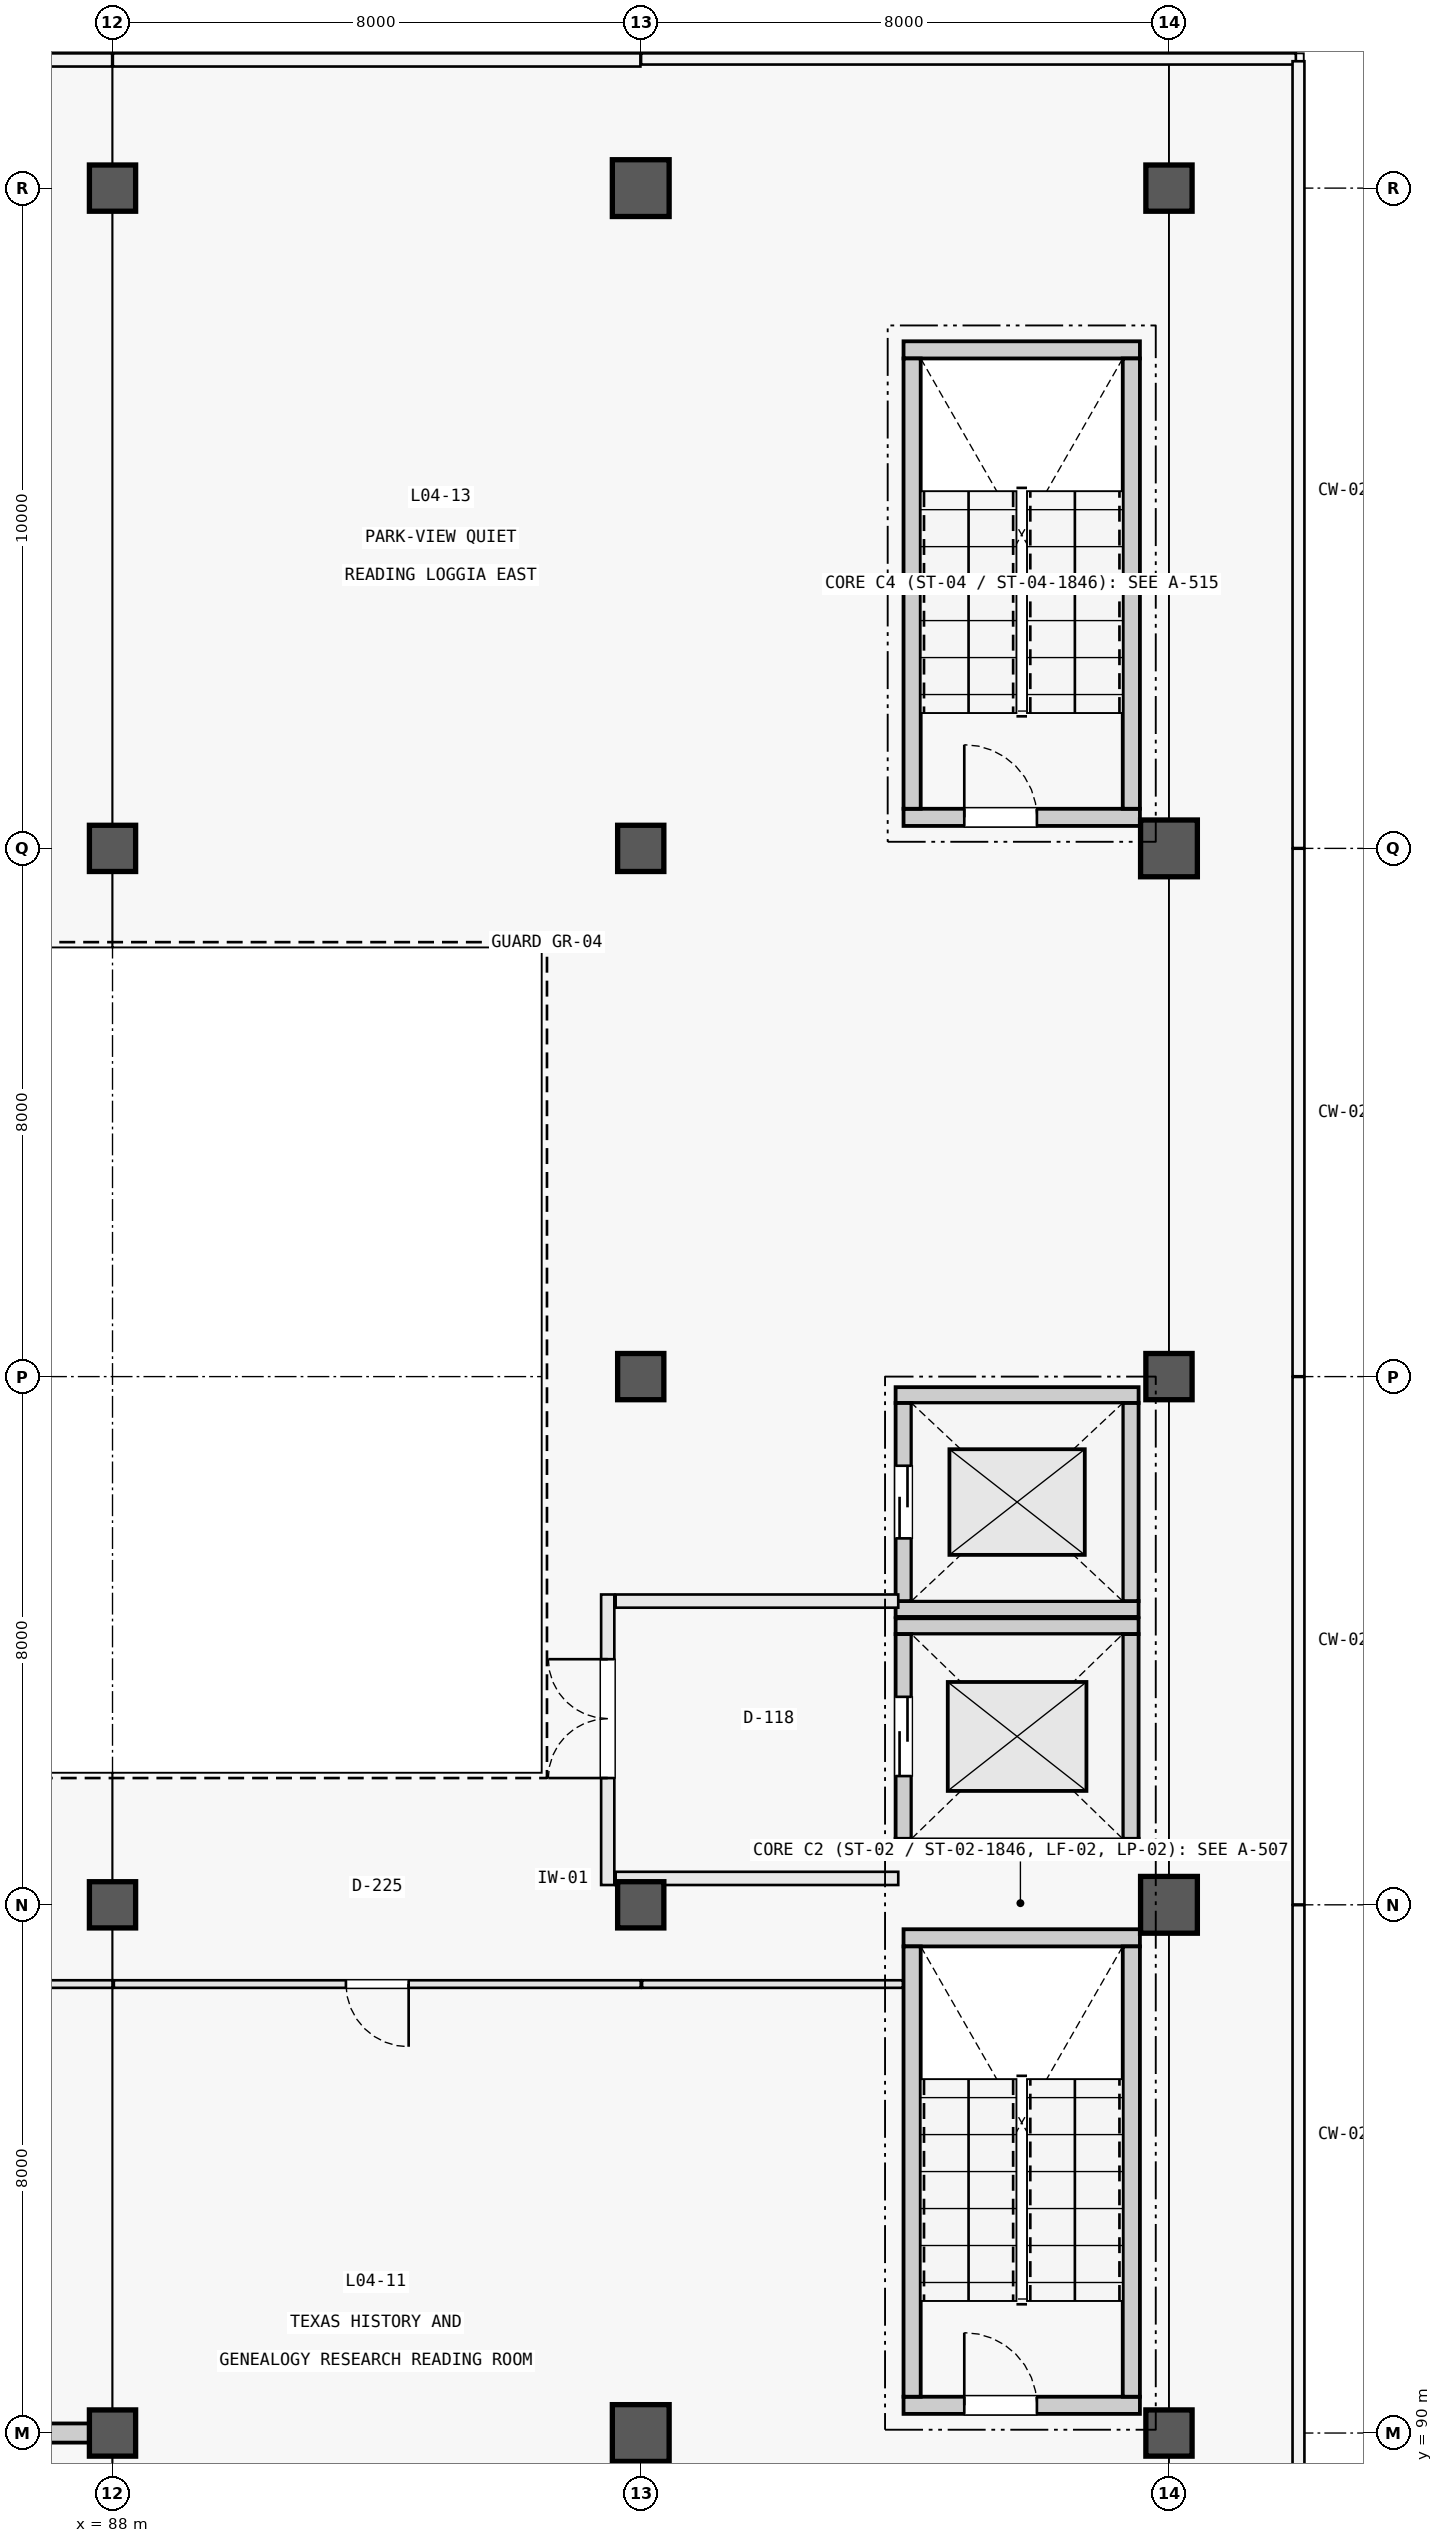
"""IFC4 building model, lengths in metres.
Left out: names, types, materials, properties, quantities, classifications, styles, units other than length and angle.
Written with IfcOpenShell. Run it as: python <this file> out.ifc"""

import sys

from ifc_helpers import new_model, si_unit, direction, frame, frame_2d, origin, origin_2d, place, context, subcontext, project, spatial, rectangle, extrude, element, fill, save


model = new_model("IFC4")
c1 = context("Model", 3, precision=1e-05, world=origin(), true_north=direction((0.0, 1.0)))
c2 = subcontext(c1, "Body", "Model", "MODEL_VIEW")
j1 = project(units=[si_unit("LENGTHUNIT", "METRE"), si_unit("PLANEANGLEUNIT", "RADIAN")], contexts=[c1])
p1 = place(None, origin())
s1 = spatial("IfcSite", under=j1, at=p1, CompositionType="ELEMENT")
p2 = place(p1, origin())
s2 = spatial("IfcBuilding", under=s1, at=p2, CompositionType="ELEMENT")
p3 = place(p2, frame((0.0, 0.0, 15.3)))
s3 = spatial("IfcBuildingStorey", under=s2, at=p3, CompositionType="ELEMENT", Elevation=15.3)
for number, where, z_axis, x_axis in (
    (1, (88.0, 90.0, 0.0), (0.0, 0.0, 1.0), (1.0, 0.0, 0.0)),
    (2, (88.0, 98.0, 0.0), (0.0, 0.0, 1.0), (1.0, 0.0, 0.0)),
    (3, (88.0, 114.0, 0.0), (0.0, 0.0, 1.0), (1.0, 0.0, 0.0)),
    (4, (88.0, 124.0, 0.0), (0.0, 0.0, 1.0), (1.0, 0.0, 0.0)),
):
    element("IfcColumn", number, at=place(p3, frame(where, z_axis=z_axis, x_axis=x_axis)), inside=s3, PredefinedType="COLUMN", context=c2, shape_type="SweptSolid", body=[
        extrude(rectangle(XDim=0.7, YDim=0.7, at=origin_2d()), origin(), (0.0, 0.0, 1.0), 4.8),
    ])
p4 = place(p3, frame((96.0, 90.0, 0.0), z_axis=(0.0, 0.0, 1.0), x_axis=(1.0, 0.0, 0.0)))
e5 = element("IfcColumn", 5, at=p4, inside=s3, PredefinedType="COLUMN", context=c2, shape_type="SweptSolid", body=[
    extrude(rectangle(XDim=0.86, YDim=0.86, at=origin_2d()), origin(), (0.0, 0.0, 1.0), 4.8),
])
for number, where, z_axis, x_axis in (
    (6, (96.0, 98.0, 0.0), (0.0, 0.0, 1.0), (1.0, 0.0, 0.0)),
    (7, (96.0, 106.0, 0.0), (0.0, 0.0, 1.0), (1.0, 0.0, 0.0)),
    (8, (96.0, 114.0, 0.0), (0.0, 0.0, 1.0), (1.0, 0.0, 0.0)),
):
    element("IfcColumn", number, at=place(p3, frame(where, z_axis=z_axis, x_axis=x_axis)), inside=s3, PredefinedType="COLUMN", context=c2, shape_type="SweptSolid", body=[
        extrude(rectangle(XDim=0.7, YDim=0.7, at=origin_2d()), origin(), (0.0, 0.0, 1.0), 4.8),
    ])
p5 = place(p3, frame((96.0, 124.0, 0.0), z_axis=(0.0, 0.0, 1.0), x_axis=(1.0, 0.0, 0.0)))
e9 = element("IfcColumn", 9, at=p5, inside=s3, PredefinedType="COLUMN", context=c2, shape_type="SweptSolid", body=[
    extrude(rectangle(XDim=0.86, YDim=0.86, at=origin_2d()), origin(), (0.0, 0.0, 1.0), 4.8),
])
p6 = place(p3, frame((104.0, 90.0, 0.0), z_axis=(0.0, 0.0, 1.0), x_axis=(1.0, 0.0, 0.0)))
e10 = element("IfcColumn", 10, at=p6, inside=s3, PredefinedType="COLUMN", context=c2, shape_type="SweptSolid", body=[
    extrude(rectangle(XDim=0.7, YDim=0.7, at=origin_2d()), origin(), (0.0, 0.0, 1.0), 4.8),
])
p7 = place(p3, frame((104.0, 98.0, 0.0), z_axis=(0.0, 0.0, 1.0), x_axis=(1.0, 0.0, 0.0)))
e11 = element("IfcColumn", 11, at=p7, inside=s3, PredefinedType="COLUMN", context=c2, shape_type="SweptSolid", body=[
    extrude(rectangle(XDim=0.86, YDim=0.86, at=origin_2d()), origin(), (0.0, 0.0, 1.0), 4.8),
])
p8 = place(p3, frame((104.0, 106.0, 0.0), z_axis=(0.0, 0.0, 1.0), x_axis=(1.0, 0.0, 0.0)))
e12 = element("IfcColumn", 12, at=p8, inside=s3, PredefinedType="COLUMN", context=c2, shape_type="SweptSolid", body=[
    extrude(rectangle(XDim=0.7, YDim=0.7, at=origin_2d()), origin(), (0.0, 0.0, 1.0), 4.8),
])
p9 = place(p3, frame((104.0, 114.0, 0.0), z_axis=(0.0, 0.0, 1.0), x_axis=(1.0, 0.0, 0.0)))
e13 = element("IfcColumn", 13, at=p9, inside=s3, PredefinedType="COLUMN", context=c2, shape_type="SweptSolid", body=[
    extrude(rectangle(XDim=0.86, YDim=0.86, at=origin_2d()), origin(), (0.0, 0.0, 1.0), 4.8),
])
p10 = place(p3, frame((104.0, 124.0, 0.0), z_axis=(0.0, 0.0, 1.0), x_axis=(1.0, 0.0, 0.0)))
e14 = element("IfcColumn", 14, at=p10, inside=s3, PredefinedType="COLUMN", context=c2, shape_type="SweptSolid", body=[
    extrude(rectangle(XDim=0.7, YDim=0.7, at=origin_2d()), origin(), (0.0, 0.0, 1.0), 4.8),
])
p11 = place(p3, frame((80.43, 90.0, 0.0), z_axis=(0.0, 0.0, 1.0), x_axis=(1.0, 0.0, 0.0)))
e15 = element("IfcWall", 15, at=p11, inside=s3, PredefinedType="SHEAR", context=c2, shape_type="SweptSolid", body=[
    extrude(rectangle(XDim=7.22, YDim=0.29, at=frame_2d((3.61, 0.0))), origin(), (0.0, 0.0, 1.0), 4.52),
])
p12 = place(p3, frame((99.98, 90.42, 0.0), z_axis=(0.0, 0.0, 1.0), x_axis=(1.0, 0.0, 0.0)))
e16 = element("IfcWall", 16, at=p12, inside=s3, PredefinedType="SOLIDWALL", context=c2, shape_type="SweptSolid", body=[
    extrude(rectangle(XDim=3.58, YDim=0.26, at=frame_2d((1.79, 0.0))), origin(), (0.0, 0.0, 1.0), 4.8),
])
p13 = place(p12, frame((0.92, 0.0, 0.0)))
e17 = element("IfcOpeningElement", 17, at=p13, cuts=e16, PredefinedType="OPENING", context=c2, shape_type="SweptSolid", body=[
    extrude(rectangle(XDim=1.1, YDim=2.2, at=frame_2d((0.55, 1.1))), frame((0.0, 0.142, 0.0), z_axis=(0.0, -1.0, 0.0), x_axis=(1.0, 0.0, 0.0)), (0.0, 0.0, 1.0), 0.284),
])
p14 = place(p3, frame((99.98, 97.5, 0.0), z_axis=(0.0, 0.0, 1.0), x_axis=(1.0, 0.0, 0.0)))
e18 = element("IfcWall", 18, at=p14, inside=s3, PredefinedType="SOLIDWALL", context=c2, shape_type="SweptSolid", body=[
    extrude(rectangle(XDim=3.58, YDim=0.26, at=frame_2d((1.79, 0.0))), origin(), (0.0, 0.0, 1.0), 4.8),
])
for number, where, z_axis, x_axis in (
    (19, (100.11, 90.55, 0.0), (0.0, 0.0, 1.0), (0.0, 1.0, 0.0)),
    (20, (103.43, 90.55, 0.0), (0.0, 0.0, 1.0), (0.0, 1.0, 0.0)),
):
    element("IfcWall", number, at=place(p3, frame(where, z_axis=z_axis, x_axis=x_axis)), inside=s3, PredefinedType="SOLIDWALL", context=c2, shape_type="SweptSolid", body=[
        extrude(rectangle(XDim=6.82, YDim=0.26, at=frame_2d((3.41, 0.0))), origin(), (0.0, 0.0, 1.0), 4.8),
    ])
p15 = place(p3, frame((99.98, 114.47, 0.0), z_axis=(0.0, 0.0, 1.0), x_axis=(1.0, 0.0, 0.0)))
e21 = element("IfcWall", 21, at=p15, inside=s3, PredefinedType="SOLIDWALL", context=c2, shape_type="SweptSolid", body=[
    extrude(rectangle(XDim=3.58, YDim=0.26, at=frame_2d((1.79, 0.0))), origin(), (0.0, 0.0, 1.0), 4.8),
])
p16 = place(p15, frame((0.92, 0.0, 0.0)))
e22 = element("IfcOpeningElement", 22, at=p16, cuts=e21, PredefinedType="OPENING", context=c2, shape_type="SweptSolid", body=[
    extrude(rectangle(XDim=1.1, YDim=2.2, at=frame_2d((0.55, 1.1))), frame((0.0, 0.142, 0.0), z_axis=(0.0, -1.0, 0.0), x_axis=(1.0, 0.0, 0.0)), (0.0, 0.0, 1.0), 0.284),
])
p17 = place(p3, frame((99.98, 121.55, 0.0), z_axis=(0.0, 0.0, 1.0), x_axis=(1.0, 0.0, 0.0)))
e23 = element("IfcWall", 23, at=p17, inside=s3, PredefinedType="SOLIDWALL", context=c2, shape_type="SweptSolid", body=[
    extrude(rectangle(XDim=3.58, YDim=0.26, at=frame_2d((1.79, 0.0))), origin(), (0.0, 0.0, 1.0), 4.8),
])
for number, where, z_axis, x_axis in (
    (24, (100.11, 114.6, 0.0), (0.0, 0.0, 1.0), (0.0, 1.0, 0.0)),
    (25, (103.43, 114.6, 0.0), (0.0, 0.0, 1.0), (0.0, 1.0, 0.0)),
):
    element("IfcWall", number, at=place(p3, frame(where, z_axis=z_axis, x_axis=x_axis)), inside=s3, PredefinedType="SOLIDWALL", context=c2, shape_type="SweptSolid", body=[
        extrude(rectangle(XDim=6.82, YDim=0.26, at=frame_2d((3.41, 0.0))), origin(), (0.0, 0.0, 1.0), 4.8),
    ])
for number, where, z_axis, x_axis in (
    (26, (99.86, 98.88, 0.0), (0.0, 0.0, 1.0), (1.0, 0.0, 0.0)),
    (27, (99.86, 102.22, 0.0), (0.0, 0.0, 1.0), (1.0, 0.0, 0.0)),
):
    element("IfcWall", number, at=place(p3, frame(where, z_axis=z_axis, x_axis=x_axis)), inside=s3, PredefinedType="SOLIDWALL", context=c2, shape_type="SweptSolid", body=[
        extrude(rectangle(XDim=3.68, YDim=0.24, at=frame_2d((1.84, 0.0))), origin(), (0.0, 0.0, 1.0), 4.8),
    ])
p18 = place(p3, frame((99.98, 99.0, 0.0), z_axis=(0.0, 0.0, 1.0), x_axis=(0.0, 1.0, 0.0)))
e28 = element("IfcWall", 28, at=p18, inside=s3, PredefinedType="SOLIDWALL", context=c2, shape_type="SweptSolid", body=[
    extrude(rectangle(XDim=3.1, YDim=0.24, at=frame_2d((1.55, 0.0))), origin(), (0.0, 0.0, 1.0), 4.8),
])
p19 = place(p18, frame((0.95, 0.0, 0.0)))
e29 = element("IfcOpeningElement", 29, at=p19, cuts=e28, PredefinedType="OPENING", context=c2, shape_type="SweptSolid", body=[
    extrude(rectangle(XDim=1.2, YDim=2.2, at=frame_2d((0.6, 1.1))), frame((0.0, 0.132, 0.0), z_axis=(0.0, -1.0, 0.0), x_axis=(1.0, 0.0, 0.0)), (0.0, 0.0, 1.0), 0.264),
])
p20 = place(p3, frame((103.42, 99.0, 0.0), z_axis=(0.0, 0.0, 1.0), x_axis=(0.0, 1.0, 0.0)))
e30 = element("IfcWall", 30, at=p20, inside=s3, PredefinedType="SOLIDWALL", context=c2, shape_type="SweptSolid", body=[
    extrude(rectangle(XDim=3.1, YDim=0.24, at=frame_2d((1.55, 0.0))), origin(), (0.0, 0.0, 1.0), 4.8),
])
for number, where, z_axis, x_axis in (
    (31, (99.86, 102.48, 0.0), (0.0, 0.0, 1.0), (1.0, 0.0, 0.0)),
    (32, (99.86, 105.72, 0.0), (0.0, 0.0, 1.0), (1.0, 0.0, 0.0)),
):
    element("IfcWall", number, at=place(p3, frame(where, z_axis=z_axis, x_axis=x_axis)), inside=s3, PredefinedType="SOLIDWALL", context=c2, shape_type="SweptSolid", body=[
        extrude(rectangle(XDim=3.68, YDim=0.24, at=frame_2d((1.84, 0.0))), origin(), (0.0, 0.0, 1.0), 4.8),
    ])
p21 = place(p3, frame((99.98, 102.6, 0.0), z_axis=(0.0, 0.0, 1.0), x_axis=(0.0, 1.0, 0.0)))
e33 = element("IfcWall", 33, at=p21, inside=s3, PredefinedType="SOLIDWALL", context=c2, shape_type="SweptSolid", body=[
    extrude(rectangle(XDim=3.0, YDim=0.24, at=frame_2d((1.5, 0.0))), origin(), (0.0, 0.0, 1.0), 4.8),
])
p22 = place(p21, frame((0.95, 0.0, 0.0)))
e34 = element("IfcOpeningElement", 34, at=p22, cuts=e33, PredefinedType="OPENING", context=c2, shape_type="SweptSolid", body=[
    extrude(rectangle(XDim=1.1, YDim=2.2, at=frame_2d((0.55, 1.1))), frame((0.0, 0.132, 0.0), z_axis=(0.0, -1.0, 0.0), x_axis=(1.0, 0.0, 0.0)), (0.0, 0.0, 1.0), 0.264),
])
p23 = place(p3, frame((103.42, 102.6, 0.0), z_axis=(0.0, 0.0, 1.0), x_axis=(0.0, 1.0, 0.0)))
e35 = element("IfcWall", 35, at=p23, inside=s3, PredefinedType="SOLIDWALL", context=c2, shape_type="SweptSolid", body=[
    extrude(rectangle(XDim=3.0, YDim=0.24, at=frame_2d((1.5, 0.0))), origin(), (0.0, 0.0, 1.0), 4.8),
])
for number, where, z_axis, x_axis in (
    (36, (95.62, 98.4, 0.0), (0.0, 0.0, 1.0), (1.0, 0.0, 0.0)),
    (37, (95.62, 102.6, 0.0), (0.0, 0.0, 1.0), (1.0, 0.0, 0.0)),
):
    element("IfcWall", number, at=place(p3, frame(where, z_axis=z_axis, x_axis=x_axis)), inside=s3, PredefinedType="PARTITIONING", context=c2, shape_type="SweptSolid", body=[
        extrude(rectangle(XDim=4.28, YDim=0.2, at=frame_2d((2.14, 0.0))), origin(), (0.0, 0.0, 1.0), 3.54),
    ])
p24 = place(p3, frame((95.5, 98.3, 0.0), z_axis=(0.0, 0.0, 1.0), x_axis=(0.0, 1.0, 0.0)))
e38 = element("IfcWall", 38, at=p24, inside=s3, PredefinedType="PARTITIONING", context=c2, shape_type="SweptSolid", body=[
    extrude(rectangle(XDim=4.4, YDim=0.2, at=frame_2d((2.2, 0.0))), origin(), (0.0, 0.0, 1.0), 3.54),
])
p25 = place(p24, frame((1.62, 0.0, 0.0)))
e39 = element("IfcOpeningElement", 39, at=p25, cuts=e38, PredefinedType="OPENING", context=c2, shape_type="SweptSolid", body=[
    extrude(rectangle(XDim=1.8, YDim=2.25, at=frame_2d((0.9, 1.125))), frame((0.0, 0.112, 0.0), z_axis=(0.0, -1.0, 0.0), x_axis=(1.0, 0.0, 0.0)), (0.0, 0.0, 1.0), 0.224),
])
p26 = place(p3, frame((80.02, 96.8, 0.0), z_axis=(0.0, 0.0, 1.0), x_axis=(1.0, 0.0, 0.0)))
e40 = element("IfcWall", 40, at=p26, inside=s3, PredefinedType="PARTITIONING", context=c2, shape_type="SweptSolid", body=[
    extrude(rectangle(XDim=7.98, YDim=0.115, at=frame_2d((3.99, 0.0))), origin(), (0.0, 0.0, 1.0), 3.37),
])
p27 = place(p26, frame((3.19, 0.0, 0.0)))
e41 = element("IfcOpeningElement", 41, at=p27, cuts=e40, PredefinedType="OPENING", context=c2, shape_type="SweptSolid", body=[
    extrude(rectangle(XDim=1.6, YDim=2.2, at=frame_2d((0.8, 1.1))), frame((0.0, 0.069, 0.0), z_axis=(0.0, -1.0, 0.0), x_axis=(1.0, 0.0, 0.0)), (0.0, 0.0, 1.0), 0.139),
])
p28 = place(p3, frame((88.02, 96.8, 0.0), z_axis=(0.0, 0.0, 1.0), x_axis=(1.0, 0.0, 0.0)))
e42 = element("IfcWall", 42, at=p28, inside=s3, PredefinedType="PARTITIONING", context=c2, shape_type="SweptSolid", body=[
    extrude(rectangle(XDim=7.98, YDim=0.115, at=frame_2d((3.99, 0.0))), origin(), (0.0, 0.0, 1.0), 3.37),
])
p29 = place(p28, frame((3.515, 0.0, 0.0)))
e43 = element("IfcOpeningElement", 43, at=p29, cuts=e42, PredefinedType="OPENING", context=c2, shape_type="SweptSolid", body=[
    extrude(rectangle(XDim=0.95, YDim=2.15, at=frame_2d((0.475, 1.075))), frame((0.0, 0.069, 0.0), z_axis=(0.0, -1.0, 0.0), x_axis=(1.0, 0.0, 0.0)), (0.0, 0.0, 1.0), 0.139),
])
p30 = place(p3, frame((96.02, 96.8, 0.0), z_axis=(0.0, 0.0, 1.0), x_axis=(1.0, 0.0, 0.0)))
e44 = element("IfcWall", 44, at=p30, inside=s3, PredefinedType="PARTITIONING", context=c2, shape_type="SweptSolid", body=[
    extrude(rectangle(XDim=3.95, YDim=0.115, at=frame_2d((1.975, 0.0))), origin(), (0.0, 0.0, 1.0), 3.37),
])
p31 = place(p13, origin())
e45 = element("IfcDoor", 45, at=p31, inside=s3, OperationType="SINGLE_SWING_LEFT", PredefinedType="DOOR", context=c2, shape_type="SweptSolid", body=[
    extrude(rectangle(XDim=1.1, YDim=2.2, at=frame_2d((0.55, 1.1))), frame((0.0, 0.025, 0.0), z_axis=(0.0, -1.0, 0.0), x_axis=(1.0, 0.0, 0.0)), (0.0, 0.0, 1.0), 0.05),
])
fill(e17, e45)
p32 = place(p16, origin())
e46 = element("IfcDoor", 46, at=p32, inside=s3, OperationType="SINGLE_SWING_LEFT", PredefinedType="DOOR", context=c2, shape_type="SweptSolid", body=[
    extrude(rectangle(XDim=1.1, YDim=2.2, at=frame_2d((0.55, 1.1))), frame((0.0, 0.025, 0.0), z_axis=(0.0, -1.0, 0.0), x_axis=(1.0, 0.0, 0.0)), (0.0, 0.0, 1.0), 0.05),
])
fill(e22, e46)
p33 = place(p19, origin())
e47 = element("IfcDoor", 47, at=p33, inside=s3, OperationType="DOUBLE_DOOR_SLIDING", PredefinedType="DOOR", context=c2, shape_type="SweptSolid", body=[
    extrude(rectangle(XDim=1.2, YDim=2.2, at=frame_2d((0.6, 1.1))), frame((0.0, 0.025, 0.0), z_axis=(0.0, -1.0, 0.0), x_axis=(1.0, 0.0, 0.0)), (0.0, 0.0, 1.0), 0.05),
])
fill(e29, e47)
p34 = place(p22, origin())
e48 = element("IfcDoor", 48, at=p34, inside=s3, OperationType="DOUBLE_DOOR_SLIDING", PredefinedType="DOOR", context=c2, shape_type="SweptSolid", body=[
    extrude(rectangle(XDim=1.1, YDim=2.2, at=frame_2d((0.55, 1.1))), frame((0.0, 0.025, 0.0), z_axis=(0.0, -1.0, 0.0), x_axis=(1.0, 0.0, 0.0)), (0.0, 0.0, 1.0), 0.05),
])
fill(e34, e48)
p35 = place(p25, origin())
e49 = element("IfcDoor", 49, at=p35, inside=s3, OperationType="DOUBLE_DOOR_SINGLE_SWING", PredefinedType="DOOR", context=c2, shape_type="SweptSolid", body=[
    extrude(rectangle(XDim=1.8, YDim=2.25, at=frame_2d((0.9, 1.125))), frame((0.0, 0.025, 0.0), z_axis=(0.0, -1.0, 0.0), x_axis=(1.0, 0.0, 0.0)), (0.0, 0.0, 1.0), 0.05),
])
fill(e39, e49)
p36 = place(p29, frame((0.95, 0.0, 0.0), z_axis=(0.0, 0.0, 1.0), x_axis=(-1.0, 0.0, 0.0)))
e50 = element("IfcDoor", 50, at=p36, inside=s3, OperationType="SINGLE_SWING_RIGHT", PredefinedType="DOOR", context=c2, shape_type="SweptSolid", body=[
    extrude(rectangle(XDim=0.95, YDim=2.15, at=frame_2d((0.475, 1.075))), frame((0.0, 0.025, 0.0), z_axis=(0.0, -1.0, 0.0), x_axis=(1.0, 0.0, 0.0)), (0.0, 0.0, 1.0), 0.05),
])
fill(e43, e50)
save(model, sys.argv[1])
